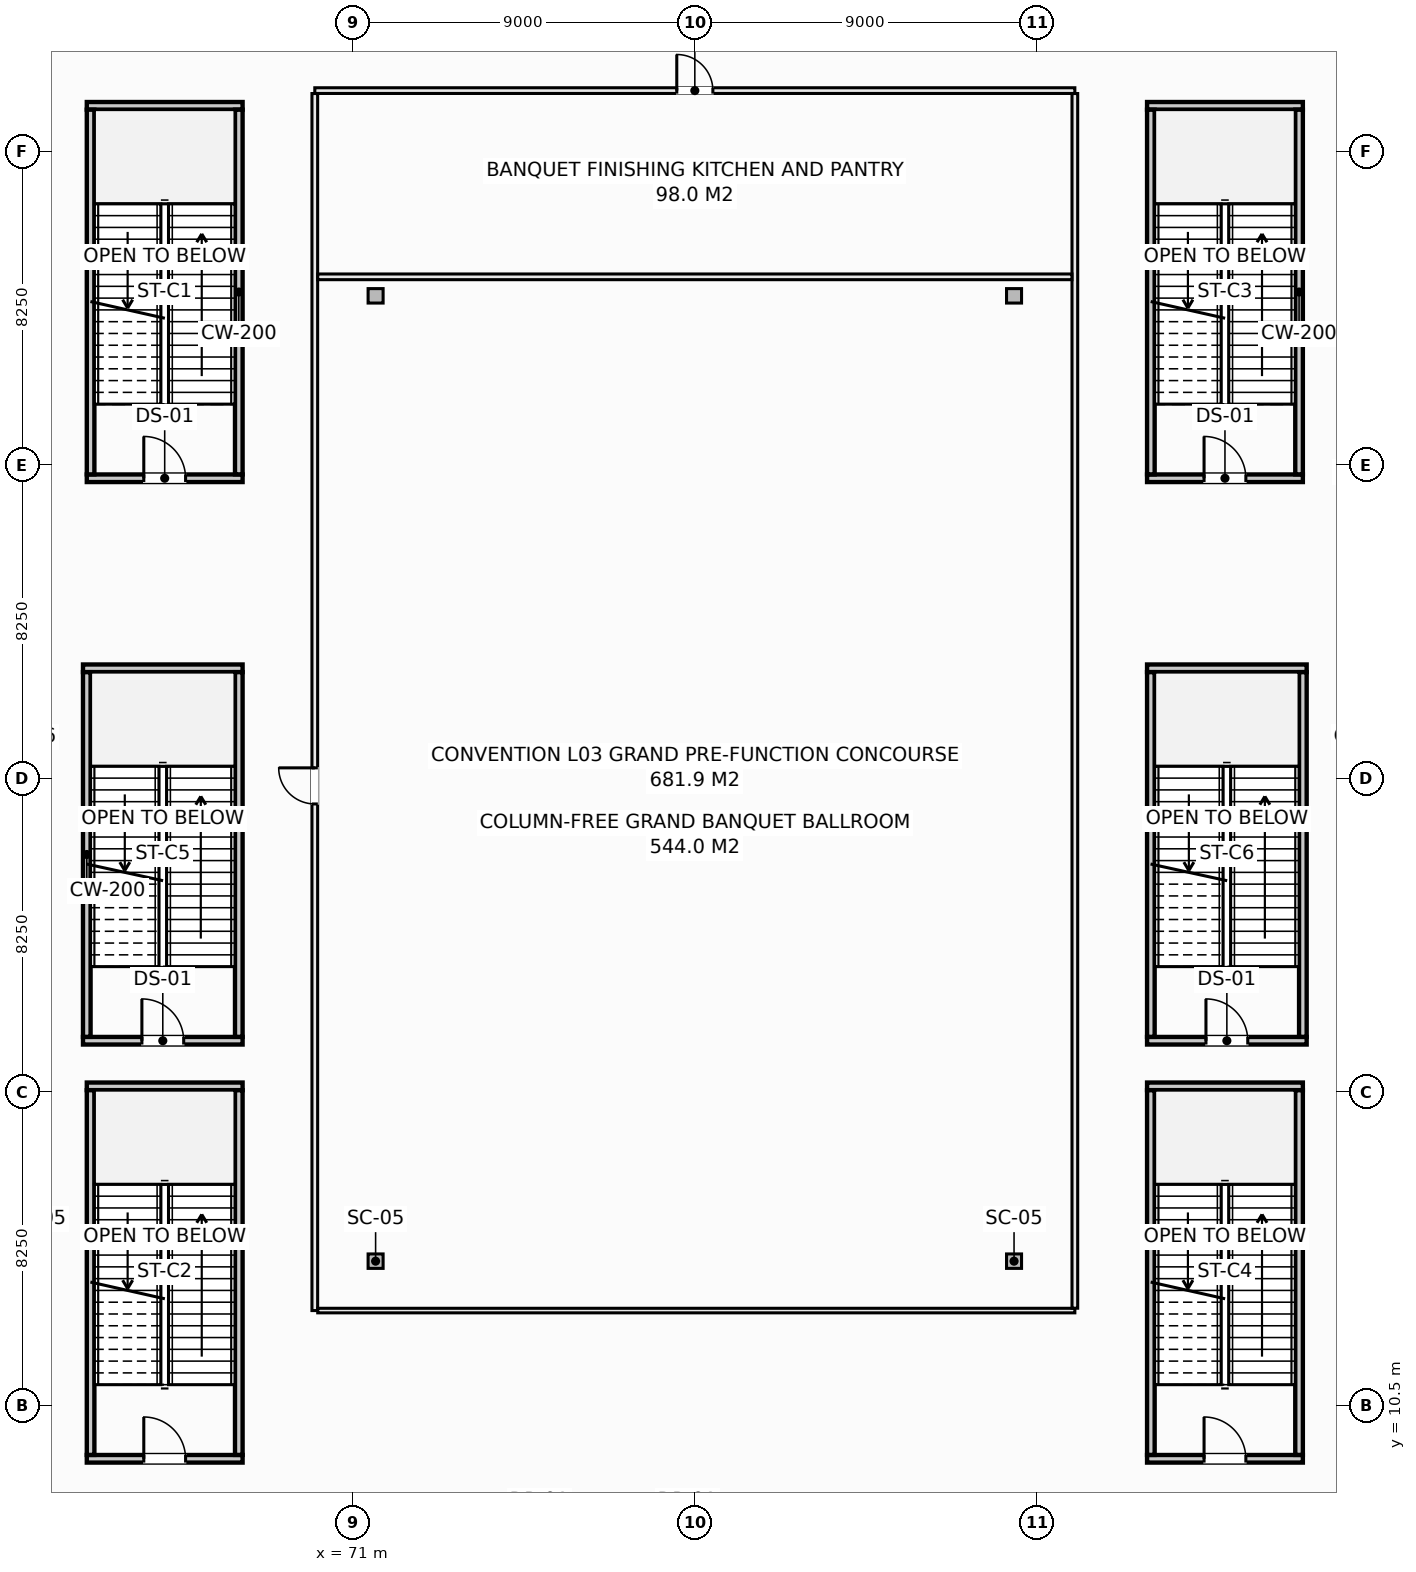
"""IFC4 building model, lengths in metres.
Left out: names, types, materials, properties, quantities, classifications, styles, units other than length and angle.
Written with IfcOpenShell. Run it as: python <this file> out.ifc"""

import sys

from ifc_helpers import new_model, si_unit, direction, frame, frame_2d, origin, origin_2d, place, context, subcontext, project, spatial, rectangle, i_section, extrude, element, fill, save


model = new_model("IFC4")
c1 = context("Model", 3, precision=1e-05, world=origin(), true_north=direction((0.0, 1.0)))
c2 = subcontext(c1, "Body", "Model", "MODEL_VIEW")
j1 = project(units=[si_unit("LENGTHUNIT", "METRE"), si_unit("PLANEANGLEUNIT", "RADIAN")], contexts=[c1])
p1 = place(None, origin())
s1 = spatial("IfcSite", under=j1, at=p1, CompositionType="ELEMENT")
p2 = place(p1, origin())
s2 = spatial("IfcBuilding", under=s1, at=p2, CompositionType="ELEMENT")
p3 = place(p2, frame((0.0, 0.0, 15.0)))
s3 = spatial("IfcBuildingStorey", under=s2, at=p3, CompositionType="ELEMENT", Elevation=15.0)
for number, where, z_axis, x_axis in (
    (1, (71.6, 14.3, -0.24), (0.0, 0.0, 1.0), (1.0, 0.0, 0.0)),
    (2, (71.6, 39.7, -0.24), (0.0, 0.0, 1.0), (1.0, 0.0, 0.0)),
    (3, (88.4, 14.3, -0.24), (0.0, 0.0, 1.0), (1.0, 0.0, 0.0)),
    (4, (88.4, 39.7, -0.24), (0.0, 0.0, 1.0), (1.0, 0.0, 0.0)),
):
    element("IfcColumn", number, at=place(p3, frame(where, z_axis=z_axis, x_axis=x_axis)), inside=s3, PredefinedType="COLUMN", context=c2, shape_type="SweptSolid", body=[
        extrude(i_section(OverallWidth=0.395, OverallDepth=0.38, WebThickness=0.019, FlangeThickness=0.03, at=origin_2d()), origin(), (0.0, 0.0, 1.0), 6.0),
    ])
p4 = place(p3, frame((64.0, 34.9, -0.24), z_axis=(0.0, 0.0, 1.0), x_axis=(1.0, 0.0, 0.0)))
e5 = element("IfcWall", 5, at=p4, inside=s3, PredefinedType="SHEAR", context=c2, shape_type="SweptSolid", body=[
    extrude(rectangle(XDim=4.1, YDim=0.2, at=frame_2d((2.05, 0.0))), origin(), (0.0, 0.0, 1.0), 6.0),
])
p5 = place(p4, frame((1.5, 0.0, 0.24)))
e6 = element("IfcOpeningElement", 6, at=p5, cuts=e5, PredefinedType="OPENING", context=c2, shape_type="SweptSolid", body=[
    extrude(rectangle(XDim=1.1, YDim=2.15, at=frame_2d((0.55, 1.075))), frame((0.0, 0.11, 0.0), z_axis=(0.0, -1.0, 0.0), x_axis=(1.0, 0.0, 0.0)), (0.0, 0.0, 1.0), 0.22),
])
p6 = place(p3, frame((64.0, 44.7, -0.24), z_axis=(0.0, 0.0, 1.0), x_axis=(1.0, 0.0, 0.0)))
e7 = element("IfcWall", 7, at=p6, inside=s3, PredefinedType="SHEAR", context=c2, shape_type="SweptSolid", body=[
    extrude(rectangle(XDim=4.1, YDim=0.2, at=frame_2d((2.05, 0.0))), origin(), (0.0, 0.0, 1.0), 6.0),
])
for number, where, z_axis, x_axis in (
    (8, (64.1, 35.002, -0.24), (0.0, 0.0, 1.0), (0.0, 1.0, 0.0)),
    (9, (68.0, 35.002, -0.24), (0.0, 0.0, 1.0), (0.0, 1.0, 0.0)),
):
    element("IfcWall", number, at=place(p3, frame(where, z_axis=z_axis, x_axis=x_axis)), inside=s3, PredefinedType="SHEAR", context=c2, shape_type="SweptSolid", body=[
        extrude(rectangle(XDim=9.596, YDim=0.2, at=frame_2d((4.798, 0.0))), origin(), (0.0, 0.0, 1.0), 6.0),
    ])
p7 = place(p3, frame((64.0, 9.1, -0.24), z_axis=(0.0, 0.0, 1.0), x_axis=(1.0, 0.0, 0.0)))
e10 = element("IfcWall", 10, at=p7, inside=s3, PredefinedType="SHEAR", context=c2, shape_type="SweptSolid", body=[
    extrude(rectangle(XDim=4.1, YDim=0.2, at=frame_2d((2.05, 0.0))), origin(), (0.0, 0.0, 1.0), 6.0),
])
p8 = place(p7, frame((1.5, 0.0, 0.24)))
e11 = element("IfcOpeningElement", 11, at=p8, cuts=e10, PredefinedType="OPENING", context=c2, shape_type="SweptSolid", body=[
    extrude(rectangle(XDim=1.1, YDim=2.15, at=frame_2d((0.55, 1.075))), frame((0.0, 0.11, 0.0), z_axis=(0.0, -1.0, 0.0), x_axis=(1.0, 0.0, 0.0)), (0.0, 0.0, 1.0), 0.22),
])
p9 = place(p3, frame((64.0, 18.9, -0.24), z_axis=(0.0, 0.0, 1.0), x_axis=(1.0, 0.0, 0.0)))
e12 = element("IfcWall", 12, at=p9, inside=s3, PredefinedType="SHEAR", context=c2, shape_type="SweptSolid", body=[
    extrude(rectangle(XDim=4.1, YDim=0.2, at=frame_2d((2.05, 0.0))), origin(), (0.0, 0.0, 1.0), 6.0),
])
for number, where, z_axis, x_axis in (
    (13, (64.1, 9.202, -0.24), (0.0, 0.0, 1.0), (0.0, 1.0, 0.0)),
    (14, (68.0, 9.202, -0.24), (0.0, 0.0, 1.0), (0.0, 1.0, 0.0)),
):
    element("IfcWall", number, at=place(p3, frame(where, z_axis=z_axis, x_axis=x_axis)), inside=s3, PredefinedType="SHEAR", context=c2, shape_type="SweptSolid", body=[
        extrude(rectangle(XDim=9.596, YDim=0.2, at=frame_2d((4.798, 0.0))), origin(), (0.0, 0.0, 1.0), 6.0),
    ])
p10 = place(p3, frame((91.9, 34.9, -0.24), z_axis=(0.0, 0.0, 1.0), x_axis=(1.0, 0.0, 0.0)))
e15 = element("IfcWall", 15, at=p10, inside=s3, PredefinedType="SHEAR", context=c2, shape_type="SweptSolid", body=[
    extrude(rectangle(XDim=4.1, YDim=0.2, at=frame_2d((2.05, 0.0))), origin(), (0.0, 0.0, 1.0), 6.0),
])
p11 = place(p10, frame((1.5, 0.0, 0.24)))
e16 = element("IfcOpeningElement", 16, at=p11, cuts=e15, PredefinedType="OPENING", context=c2, shape_type="SweptSolid", body=[
    extrude(rectangle(XDim=1.1, YDim=2.15, at=frame_2d((0.55, 1.075))), frame((0.0, 0.11, 0.0), z_axis=(0.0, -1.0, 0.0), x_axis=(1.0, 0.0, 0.0)), (0.0, 0.0, 1.0), 0.22),
])
p12 = place(p3, frame((91.9, 44.7, -0.24), z_axis=(0.0, 0.0, 1.0), x_axis=(1.0, 0.0, 0.0)))
e17 = element("IfcWall", 17, at=p12, inside=s3, PredefinedType="SHEAR", context=c2, shape_type="SweptSolid", body=[
    extrude(rectangle(XDim=4.1, YDim=0.2, at=frame_2d((2.05, 0.0))), origin(), (0.0, 0.0, 1.0), 6.0),
])
for number, where, z_axis, x_axis in (
    (18, (92.0, 35.002, -0.24), (0.0, 0.0, 1.0), (0.0, 1.0, 0.0)),
    (19, (95.9, 35.002, -0.24), (0.0, 0.0, 1.0), (0.0, 1.0, 0.0)),
):
    element("IfcWall", number, at=place(p3, frame(where, z_axis=z_axis, x_axis=x_axis)), inside=s3, PredefinedType="SHEAR", context=c2, shape_type="SweptSolid", body=[
        extrude(rectangle(XDim=9.596, YDim=0.2, at=frame_2d((4.798, 0.0))), origin(), (0.0, 0.0, 1.0), 6.0),
    ])
p13 = place(p3, frame((91.9, 9.1, -0.24), z_axis=(0.0, 0.0, 1.0), x_axis=(1.0, 0.0, 0.0)))
e20 = element("IfcWall", 20, at=p13, inside=s3, PredefinedType="SHEAR", context=c2, shape_type="SweptSolid", body=[
    extrude(rectangle(XDim=4.1, YDim=0.2, at=frame_2d((2.05, 0.0))), origin(), (0.0, 0.0, 1.0), 6.0),
])
p14 = place(p13, frame((1.5, 0.0, 0.24)))
e21 = element("IfcOpeningElement", 21, at=p14, cuts=e20, PredefinedType="OPENING", context=c2, shape_type="SweptSolid", body=[
    extrude(rectangle(XDim=1.1, YDim=2.15, at=frame_2d((0.55, 1.075))), frame((0.0, 0.11, 0.0), z_axis=(0.0, -1.0, 0.0), x_axis=(1.0, 0.0, 0.0)), (0.0, 0.0, 1.0), 0.22),
])
p15 = place(p3, frame((91.9, 18.9, -0.24), z_axis=(0.0, 0.0, 1.0), x_axis=(1.0, 0.0, 0.0)))
e22 = element("IfcWall", 22, at=p15, inside=s3, PredefinedType="SHEAR", context=c2, shape_type="SweptSolid", body=[
    extrude(rectangle(XDim=4.1, YDim=0.2, at=frame_2d((2.05, 0.0))), origin(), (0.0, 0.0, 1.0), 6.0),
])
for number, where, z_axis, x_axis in (
    (23, (92.0, 9.202, -0.24), (0.0, 0.0, 1.0), (0.0, 1.0, 0.0)),
    (24, (95.9, 9.202, -0.24), (0.0, 0.0, 1.0), (0.0, 1.0, 0.0)),
):
    element("IfcWall", number, at=place(p3, frame(where, z_axis=z_axis, x_axis=x_axis)), inside=s3, PredefinedType="SHEAR", context=c2, shape_type="SweptSolid", body=[
        extrude(rectangle(XDim=9.596, YDim=0.2, at=frame_2d((4.798, 0.0))), origin(), (0.0, 0.0, 1.0), 6.0),
    ])
p16 = place(p3, frame((63.9, 20.1, -0.24), z_axis=(0.0, 0.0, 1.0), x_axis=(1.0, 0.0, 0.0)))
e25 = element("IfcWall", 25, at=p16, inside=s3, PredefinedType="SHEAR", context=c2, shape_type="SweptSolid", body=[
    extrude(rectangle(XDim=4.2, YDim=0.2, at=frame_2d((2.1, 0.0))), origin(), (0.0, 0.0, 1.0), 6.0),
])
p17 = place(p16, frame((1.55, 0.0, 0.24)))
e26 = element("IfcOpeningElement", 26, at=p17, cuts=e25, PredefinedType="OPENING", context=c2, shape_type="SweptSolid", body=[
    extrude(rectangle(XDim=1.1, YDim=2.15, at=frame_2d((0.55, 1.075))), frame((0.0, 0.11, 0.0), z_axis=(0.0, -1.0, 0.0), x_axis=(1.0, 0.0, 0.0)), (0.0, 0.0, 1.0), 0.22),
])
p18 = place(p3, frame((63.9, 29.9, -0.24), z_axis=(0.0, 0.0, 1.0), x_axis=(1.0, 0.0, 0.0)))
e27 = element("IfcWall", 27, at=p18, inside=s3, PredefinedType="SHEAR", context=c2, shape_type="SweptSolid", body=[
    extrude(rectangle(XDim=4.2, YDim=0.2, at=frame_2d((2.1, 0.0))), origin(), (0.0, 0.0, 1.0), 6.0),
])
for number, where, z_axis, x_axis in (
    (28, (64.0, 20.202, -0.24), (0.0, 0.0, 1.0), (0.0, 1.0, 0.0)),
    (29, (68.0, 20.202, -0.24), (0.0, 0.0, 1.0), (0.0, 1.0, 0.0)),
):
    element("IfcWall", number, at=place(p3, frame(where, z_axis=z_axis, x_axis=x_axis)), inside=s3, PredefinedType="SHEAR", context=c2, shape_type="SweptSolid", body=[
        extrude(rectangle(XDim=9.596, YDim=0.2, at=frame_2d((4.798, 0.0))), origin(), (0.0, 0.0, 1.0), 6.0),
    ])
p19 = place(p3, frame((91.9, 20.1, -0.24), z_axis=(0.0, 0.0, 1.0), x_axis=(1.0, 0.0, 0.0)))
e30 = element("IfcWall", 30, at=p19, inside=s3, PredefinedType="SHEAR", context=c2, shape_type="SweptSolid", body=[
    extrude(rectangle(XDim=4.2, YDim=0.2, at=frame_2d((2.1, 0.0))), origin(), (0.0, 0.0, 1.0), 6.0),
])
p20 = place(p19, frame((1.55, 0.0, 0.24)))
e31 = element("IfcOpeningElement", 31, at=p20, cuts=e30, PredefinedType="OPENING", context=c2, shape_type="SweptSolid", body=[
    extrude(rectangle(XDim=1.1, YDim=2.15, at=frame_2d((0.55, 1.075))), frame((0.0, 0.11, 0.0), z_axis=(0.0, -1.0, 0.0), x_axis=(1.0, 0.0, 0.0)), (0.0, 0.0, 1.0), 0.22),
])
p21 = place(p3, frame((91.9, 29.9, -0.24), z_axis=(0.0, 0.0, 1.0), x_axis=(1.0, 0.0, 0.0)))
e32 = element("IfcWall", 32, at=p21, inside=s3, PredefinedType="SHEAR", context=c2, shape_type="SweptSolid", body=[
    extrude(rectangle(XDim=4.2, YDim=0.2, at=frame_2d((2.1, 0.0))), origin(), (0.0, 0.0, 1.0), 6.0),
])
for number, where, z_axis, x_axis in (
    (33, (92.0, 20.202, -0.24), (0.0, 0.0, 1.0), (0.0, 1.0, 0.0)),
    (34, (96.0, 20.202, -0.24), (0.0, 0.0, 1.0), (0.0, 1.0, 0.0)),
):
    element("IfcWall", number, at=place(p3, frame(where, z_axis=z_axis, x_axis=x_axis)), inside=s3, PredefinedType="SHEAR", context=c2, shape_type="SweptSolid", body=[
        extrude(rectangle(XDim=9.596, YDim=0.2, at=frame_2d((4.798, 0.0))), origin(), (0.0, 0.0, 1.0), 6.0),
    ])
p22 = place(p3, frame((70.0, 45.1, 0.0), z_axis=(0.0, 0.0, 1.0), x_axis=(1.0, 0.0, 0.0)))
e35 = element("IfcWall", 35, at=p22, inside=s3, PredefinedType="PARTITIONING", context=c2, shape_type="SweptSolid", body=[
    extrude(rectangle(XDim=20.0, YDim=0.15, at=frame_2d((10.0, 0.0))), origin(), (0.0, 0.0, 1.0), 5.76),
])
p23 = place(p22, frame((9.525, 0.0, 0.0)))
e36 = element("IfcOpeningElement", 36, at=p23, cuts=e35, PredefinedType="OPENING", context=c2, shape_type="SweptSolid", body=[
    extrude(rectangle(XDim=0.95, YDim=2.1, at=frame_2d((0.475, 1.05))), frame((0.0, 0.085, 0.0), z_axis=(0.0, -1.0, 0.0), x_axis=(1.0, 0.0, 0.0)), (0.0, 0.0, 1.0), 0.17),
])
p24 = place(p3, frame((70.0, 13.0, 0.0), z_axis=(0.0, 0.0, 1.0), x_axis=(0.0, 1.0, 0.0)))
e37 = element("IfcWall", 37, at=p24, inside=s3, PredefinedType="PARTITIONING", context=c2, shape_type="SweptSolid", body=[
    extrude(rectangle(XDim=32.023, YDim=0.15, at=frame_2d((16.011, 0.0))), origin(), (0.0, 0.0, 1.0), 5.76),
])
p25 = place(p24, frame((13.33, 0.0, 0.0)))
e38 = element("IfcOpeningElement", 38, at=p25, cuts=e37, PredefinedType="OPENING", context=c2, shape_type="SweptSolid", body=[
    extrude(rectangle(XDim=0.95, YDim=2.1, at=frame_2d((0.475, 1.05))), frame((0.0, 0.085, 0.0), z_axis=(0.0, -1.0, 0.0), x_axis=(1.0, 0.0, 0.0)), (0.0, 0.0, 1.0), 0.17),
])
p26 = place(p3, frame((70.077, 13.0, 0.0), z_axis=(0.0, 0.0, 1.0), x_axis=(1.0, 0.0, 0.0)))
e39 = element("IfcWall", 39, at=p26, inside=s3, PredefinedType="PARTITIONING", context=c2, shape_type="SweptSolid", body=[
    extrude(rectangle(XDim=19.923, YDim=0.12, at=frame_2d((9.961, 0.0))), origin(), (0.0, 0.0, 1.0), 5.76),
])
p27 = place(p3, frame((90.0, 13.062, 0.0), z_axis=(0.0, 0.0, 1.0), x_axis=(0.0, 1.0, 0.0)))
e40 = element("IfcWall", 40, at=p27, inside=s3, PredefinedType="PARTITIONING", context=c2, shape_type="SweptSolid", body=[
    extrude(rectangle(XDim=31.961, YDim=0.15, at=frame_2d((15.98, 0.0))), origin(), (0.0, 0.0, 1.0), 5.76),
])
p28 = place(p3, frame((70.077, 40.2, 0.0), z_axis=(0.0, 0.0, 1.0), x_axis=(1.0, 0.0, 0.0)))
e41 = element("IfcWall", 41, at=p28, inside=s3, PredefinedType="PARTITIONING", context=c2, shape_type="SweptSolid", body=[
    extrude(rectangle(XDim=19.846, YDim=0.15, at=frame_2d((9.923, 0.0))), origin(), (0.0, 0.0, 1.0), 5.76),
])
p29 = place(p5, origin())
e42 = element("IfcDoor", 42, at=p29, inside=s3, OperationType="SINGLE_SWING_LEFT", PredefinedType="DOOR", context=c2, shape_type="SweptSolid", body=[
    extrude(rectangle(XDim=1.1, YDim=2.15, at=frame_2d((0.55, 1.075))), frame((0.0, 0.025, 0.0), z_axis=(0.0, -1.0, 0.0), x_axis=(1.0, 0.0, 0.0)), (0.0, 0.0, 1.0), 0.05),
])
fill(e6, e42)
p30 = place(p8, origin())
e43 = element("IfcDoor", 43, at=p30, inside=s3, OperationType="SINGLE_SWING_LEFT", PredefinedType="DOOR", context=c2, shape_type="SweptSolid", body=[
    extrude(rectangle(XDim=1.1, YDim=2.15, at=frame_2d((0.55, 1.075))), frame((0.0, 0.025, 0.0), z_axis=(0.0, -1.0, 0.0), x_axis=(1.0, 0.0, 0.0)), (0.0, 0.0, 1.0), 0.05),
])
fill(e11, e43)
p31 = place(p11, origin())
e44 = element("IfcDoor", 44, at=p31, inside=s3, OperationType="SINGLE_SWING_LEFT", PredefinedType="DOOR", context=c2, shape_type="SweptSolid", body=[
    extrude(rectangle(XDim=1.1, YDim=2.15, at=frame_2d((0.55, 1.075))), frame((0.0, 0.025, 0.0), z_axis=(0.0, -1.0, 0.0), x_axis=(1.0, 0.0, 0.0)), (0.0, 0.0, 1.0), 0.05),
])
fill(e16, e44)
p32 = place(p14, origin())
e45 = element("IfcDoor", 45, at=p32, inside=s3, OperationType="SINGLE_SWING_LEFT", PredefinedType="DOOR", context=c2, shape_type="SweptSolid", body=[
    extrude(rectangle(XDim=1.1, YDim=2.15, at=frame_2d((0.55, 1.075))), frame((0.0, 0.025, 0.0), z_axis=(0.0, -1.0, 0.0), x_axis=(1.0, 0.0, 0.0)), (0.0, 0.0, 1.0), 0.05),
])
fill(e21, e45)
p33 = place(p17, origin())
e46 = element("IfcDoor", 46, at=p33, inside=s3, OperationType="SINGLE_SWING_LEFT", PredefinedType="DOOR", context=c2, shape_type="SweptSolid", body=[
    extrude(rectangle(XDim=1.1, YDim=2.15, at=frame_2d((0.55, 1.075))), frame((0.0, 0.025, 0.0), z_axis=(0.0, -1.0, 0.0), x_axis=(1.0, 0.0, 0.0)), (0.0, 0.0, 1.0), 0.05),
])
fill(e26, e46)
p34 = place(p20, origin())
e47 = element("IfcDoor", 47, at=p34, inside=s3, OperationType="SINGLE_SWING_LEFT", PredefinedType="DOOR", context=c2, shape_type="SweptSolid", body=[
    extrude(rectangle(XDim=1.1, YDim=2.15, at=frame_2d((0.55, 1.075))), frame((0.0, 0.025, 0.0), z_axis=(0.0, -1.0, 0.0), x_axis=(1.0, 0.0, 0.0)), (0.0, 0.0, 1.0), 0.05),
])
fill(e31, e47)
p35 = place(p25, origin())
e48 = element("IfcDoor", 48, at=p35, inside=s3, OperationType="SINGLE_SWING_RIGHT", PredefinedType="DOOR", context=c2, shape_type="SweptSolid", body=[
    extrude(rectangle(XDim=0.95, YDim=2.1, at=frame_2d((0.475, 1.05))), frame((0.0, 0.025, 0.0), z_axis=(0.0, -1.0, 0.0), x_axis=(1.0, 0.0, 0.0)), (0.0, 0.0, 1.0), 0.05),
])
fill(e38, e48)
p36 = place(p23, origin())
e49 = element("IfcDoor", 49, at=p36, inside=s3, OperationType="SINGLE_SWING_LEFT", PredefinedType="DOOR", context=c2, shape_type="SweptSolid", body=[
    extrude(rectangle(XDim=0.95, YDim=2.1, at=frame_2d((0.475, 1.05))), frame((0.0, 0.025, 0.0), z_axis=(0.0, -1.0, 0.0), x_axis=(1.0, 0.0, 0.0)), (0.0, 0.0, 1.0), 0.05),
])
fill(e36, e49)
save(model, sys.argv[1])
